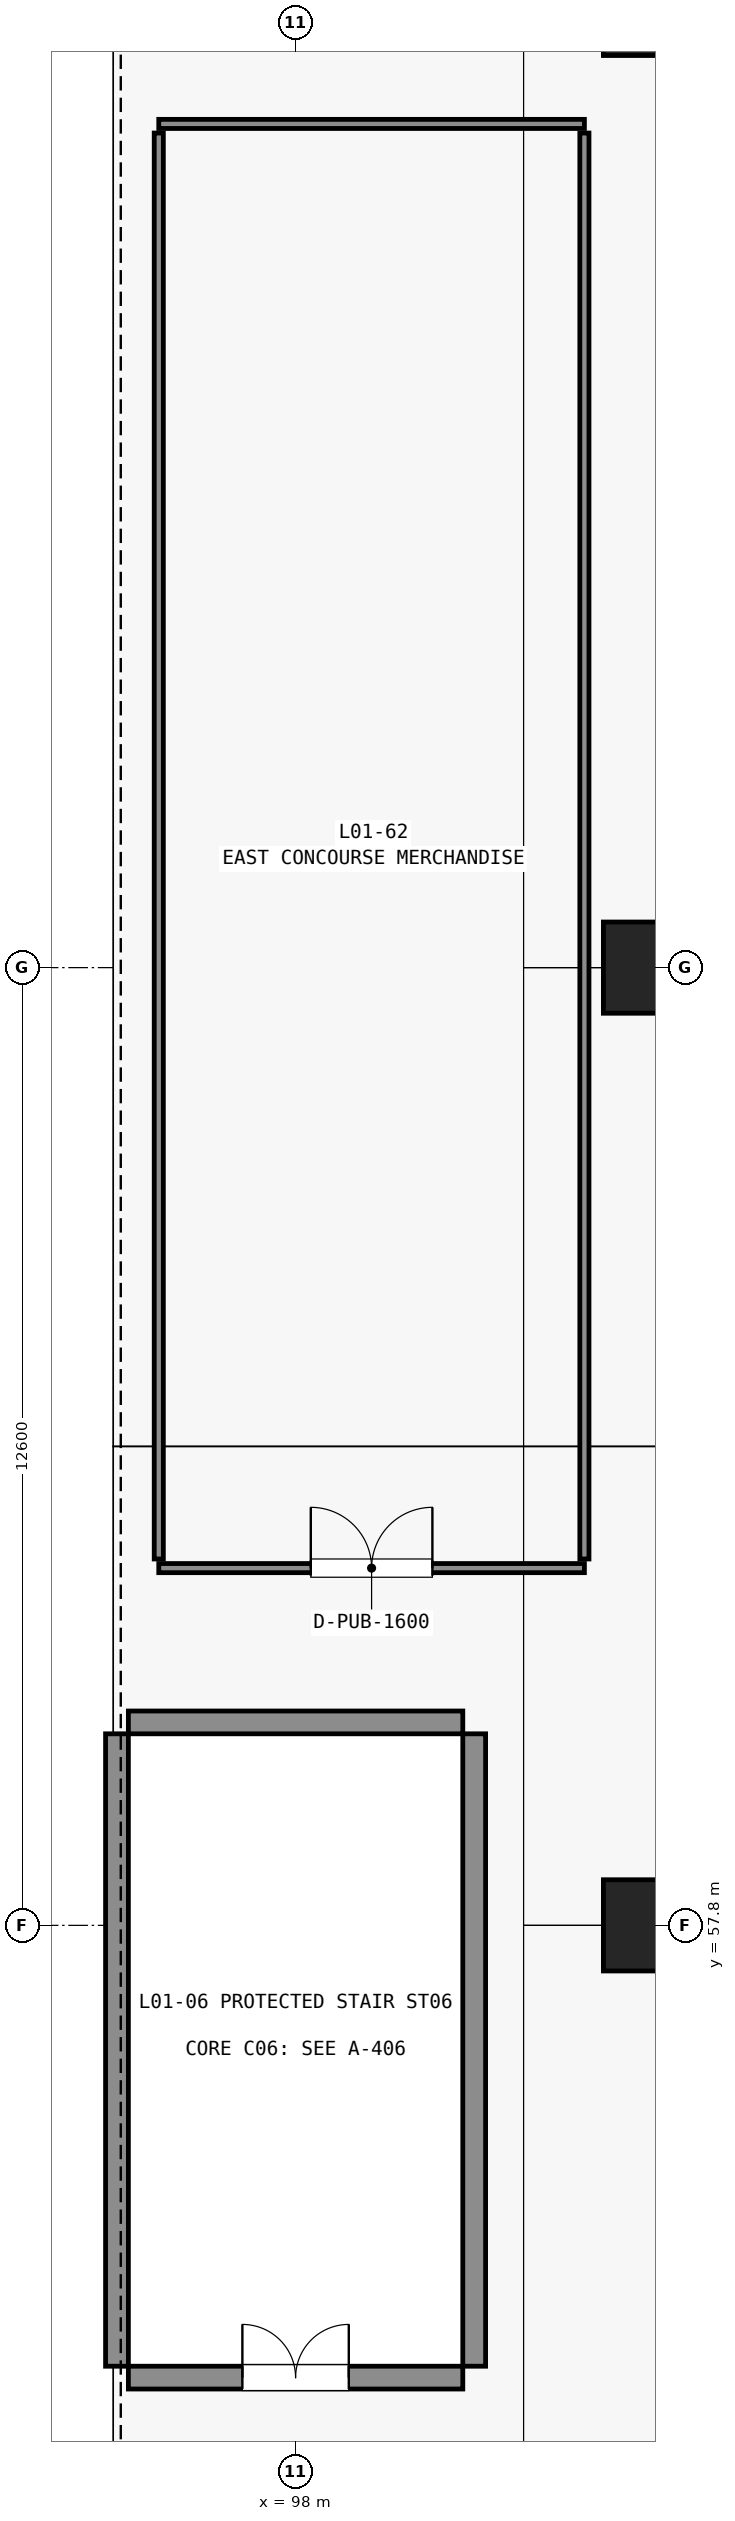
"""IFC4 building model, lengths in metres.
Left out: names, types, materials, properties, quantities, classifications, styles, units other than length and angle.
Written with IfcOpenShell. Run it as: python <this file> out.ifc"""

import sys

from ifc_helpers import new_model, si_unit, direction, frame, frame_2d, origin, origin_2d, place, context, subcontext, project, spatial, rectangle, extrude, element, fill, save


model = new_model("IFC4")
c1 = context("Model", 3, precision=1e-05, world=origin(), true_north=direction((0.0, 1.0)))
c2 = subcontext(c1, "Body", "Model", "MODEL_VIEW")
j1 = project(units=[si_unit("LENGTHUNIT", "METRE"), si_unit("PLANEANGLEUNIT", "RADIAN")], contexts=[c1])
p1 = place(None, origin())
s1 = spatial("IfcSite", under=j1, at=p1, CompositionType="ELEMENT")
p2 = place(p1, origin())
s2 = spatial("IfcBuilding", under=s1, at=p2, CompositionType="ELEMENT")
p3 = place(p2, frame((0.0, 0.0, 6.0)))
s3 = spatial("IfcBuildingStorey", under=s2, at=p3, CompositionType="ELEMENT", Elevation=6.0)
for number, where, z_axis, x_axis in (
    (1, (102.5, 57.8, 0.0), (0.0, 0.0, 1.0), (1.0, 0.0, 0.0)),
    (2, (102.5, 70.4, 0.0), (0.0, 0.0, 1.0), (1.0, 0.0, 0.0)),
    (3, (102.5, 83.0, 0.0), (0.0, 0.0, 1.0), (1.0, 0.0, 0.0)),
):
    element("IfcColumn", number, at=place(p3, frame(where, z_axis=z_axis, x_axis=x_axis)), inside=s3, PredefinedType="COLUMN", context=c2, shape_type="SweptSolid", body=[
        extrude(rectangle(XDim=0.9, YDim=1.2, at=origin_2d()), origin(), (0.0, 0.0, 1.0), 5.04),
    ])
p4 = place(p3, frame((95.8, 51.85, 0.0), z_axis=(0.0, 0.0, 1.0), x_axis=(1.0, 0.0, 0.0)))
e4 = element("IfcWall", 4, at=p4, inside=s3, PredefinedType="SHEAR", context=c2, shape_type="SweptSolid", body=[
    extrude(rectangle(XDim=4.4, YDim=0.3, at=frame_2d((2.2, 0.0))), origin(), (0.0, 0.0, 1.0), 5.04),
])
p5 = place(p4, frame((1.5, 0.0, 0.0)))
e5 = element("IfcOpeningElement", 5, at=p5, cuts=e4, PredefinedType="OPENING", context=c2, shape_type="SweptSolid", body=[
    extrude(rectangle(XDim=1.4, YDim=2.2, at=frame_2d((0.7, 1.1))), frame((0.0, 0.16, 0.0), z_axis=(0.0, -1.0, 0.0), x_axis=(1.0, 0.0, 0.0)), (0.0, 0.0, 1.0), 0.32),
])
p6 = place(p3, frame((95.8, 60.47, 0.0), z_axis=(0.0, 0.0, 1.0), x_axis=(1.0, 0.0, 0.0)))
e6 = element("IfcWall", 6, at=p6, inside=s3, PredefinedType="SHEAR", context=c2, shape_type="SweptSolid", body=[
    extrude(rectangle(XDim=4.4, YDim=0.3, at=frame_2d((2.2, 0.0))), origin(), (0.0, 0.0, 1.0), 5.04),
])
for number, where, z_axis, x_axis in (
    (7, (95.65, 52.0, 0.0), (0.0, 0.0, 1.0), (0.0, 1.0, 0.0)),
    (8, (100.35, 52.0, 0.0), (0.0, 0.0, 1.0), (0.0, 1.0, 0.0)),
):
    element("IfcWall", number, at=place(p3, frame(where, z_axis=z_axis, x_axis=x_axis)), inside=s3, PredefinedType="SHEAR", context=c2, shape_type="SweptSolid", body=[
        extrude(rectangle(XDim=8.32, YDim=0.3, at=frame_2d((4.16, 0.0))), origin(), (0.0, 0.0, 1.0), 5.04),
    ])
p7 = place(p3, frame((96.2, 62.5, 0.0), z_axis=(0.0, 0.0, 1.0), x_axis=(1.0, 0.0, 0.0)))
e9 = element("IfcWall", 9, at=p7, inside=s3, PredefinedType="PARTITIONING", context=c2, shape_type="SweptSolid", body=[
    extrude(rectangle(XDim=5.6, YDim=0.12, at=frame_2d((2.8, 0.0))), origin(), (0.0, 0.0, 1.0), 5.04),
])
p8 = place(p7, frame((2.0, 0.0, 0.0)))
e10 = element("IfcOpeningElement", 10, at=p8, cuts=e9, PredefinedType="OPENING", context=c2, shape_type="SweptSolid", body=[
    extrude(rectangle(XDim=1.6, YDim=2.25, at=frame_2d((0.8, 1.125))), frame((0.0, 0.07, 0.0), z_axis=(0.0, -1.0, 0.0), x_axis=(1.0, 0.0, 0.0)), (0.0, 0.0, 1.0), 0.14),
])
p9 = place(p3, frame((96.2, 81.5, 0.0), z_axis=(0.0, 0.0, 1.0), x_axis=(1.0, 0.0, 0.0)))
e11 = element("IfcWall", 11, at=p9, inside=s3, PredefinedType="PARTITIONING", context=c2, shape_type="SweptSolid", body=[
    extrude(rectangle(XDim=5.6, YDim=0.12, at=frame_2d((2.8, 0.0))), origin(), (0.0, 0.0, 1.0), 5.04),
])
for number, where, z_axis, x_axis in (
    (12, (96.2, 62.62, 0.0), (0.0, 0.0, 1.0), (0.0, 1.0, 0.0)),
    (13, (101.8, 62.62, 0.0), (0.0, 0.0, 1.0), (0.0, 1.0, 0.0)),
):
    element("IfcWall", number, at=place(p3, frame(where, z_axis=z_axis, x_axis=x_axis)), inside=s3, PredefinedType="PARTITIONING", context=c2, shape_type="SweptSolid", body=[
        extrude(rectangle(XDim=18.76, YDim=0.12, at=frame_2d((9.38, 0.0))), origin(), (0.0, 0.0, 1.0), 5.04),
    ])
p10 = place(p5, origin())
e14 = element("IfcDoor", 14, at=p10, inside=s3, OperationType="DOUBLE_DOOR_SINGLE_SWING", PredefinedType="DOOR", context=c2, shape_type="SweptSolid", body=[
    extrude(rectangle(XDim=1.4, YDim=2.2, at=frame_2d((0.7, 1.1))), frame((0.0, 0.025, 0.0), z_axis=(0.0, -1.0, 0.0), x_axis=(1.0, 0.0, 0.0)), (0.0, 0.0, 1.0), 0.05),
])
fill(e5, e14)
p11 = place(p8, origin())
e15 = element("IfcDoor", 15, at=p11, inside=s3, OperationType="DOUBLE_DOOR_SINGLE_SWING", PredefinedType="DOOR", context=c2, shape_type="SweptSolid", body=[
    extrude(rectangle(XDim=1.6, YDim=2.25, at=frame_2d((0.8, 1.125))), frame((0.0, 0.025, 0.0), z_axis=(0.0, -1.0, 0.0), x_axis=(1.0, 0.0, 0.0)), (0.0, 0.0, 1.0), 0.05),
])
fill(e10, e15)
save(model, sys.argv[1])
